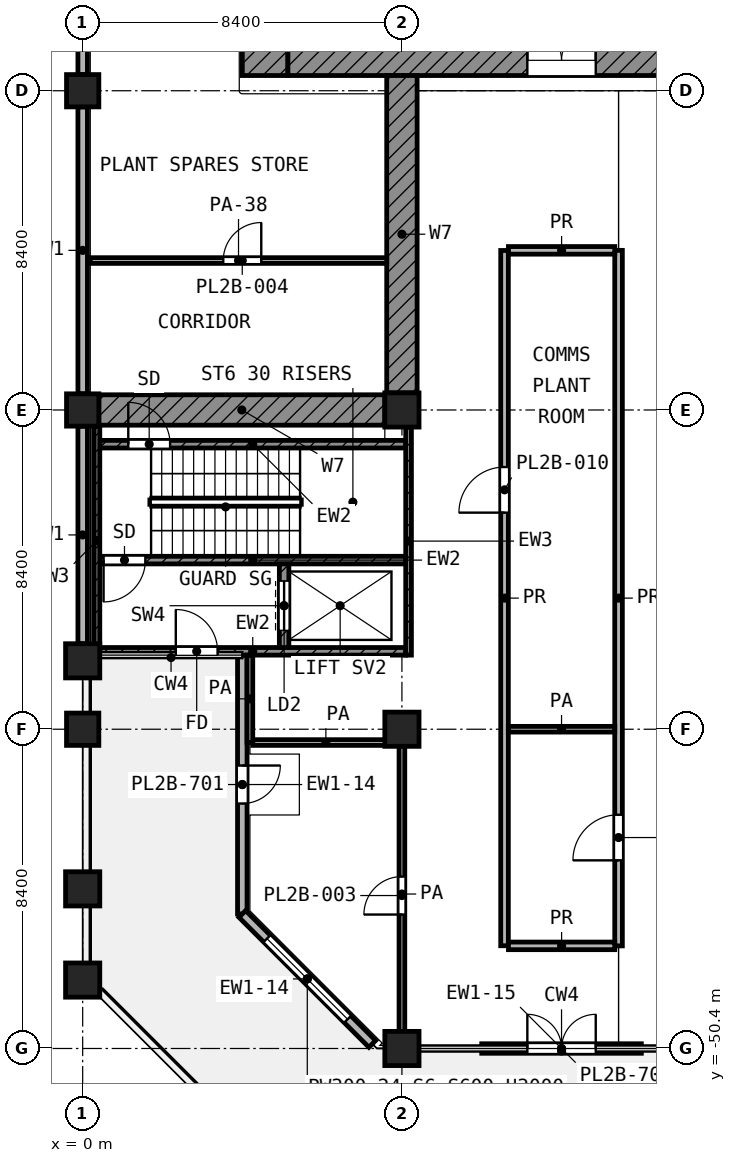
"""IFC4 building model, lengths in metres.
Left out: names, types, materials, properties, quantities, classifications, styles, units other than length and angle.
Written with IfcOpenShell. Run it as: python <this file> out.ifc"""

import sys

from ifc_helpers import new_model, si_unit, direction, frame, frame_2d, origin, origin_2d, place, context, subcontext, project, spatial, rectangle, extrude, element, fill, save


model = new_model("IFC4")
c1 = context("Model", 3, precision=1e-05, world=origin(), true_north=direction((0.0, 1.0)))
c2 = subcontext(c1, "Body", "Model", "MODEL_VIEW")
j1 = project(units=[si_unit("LENGTHUNIT", "METRE"), si_unit("PLANEANGLEUNIT", "RADIAN")], contexts=[c1])
p1 = place(None, origin())
s1 = spatial("IfcSite", under=j1, at=p1, CompositionType="ELEMENT")
p2 = place(p1, origin())
s2 = spatial("IfcBuilding", under=s1, at=p2, CompositionType="ELEMENT")
p3 = place(p2, frame((0.0, 0.0, 213.0)))
s3 = spatial("IfcBuildingStorey", under=s2, at=p3, CompositionType="ELEMENT", Elevation=213.0)
for number, where, z_axis, x_axis in (
    (1, (0.0, -25.2, 0.0), (0.0, 0.0, 1.0), (1.0, 0.0, 0.0)),
    (2, (0.0, -33.6, 0.0), (0.0, 0.0, 1.0), (1.0, 0.0, 0.0)),
):
    element("IfcColumn", number, at=place(p3, frame(where, z_axis=z_axis, x_axis=x_axis)), inside=s3, PredefinedType="COLUMN", context=c2, shape_type="SweptSolid", body=[
        extrude(rectangle(XDim=0.85, YDim=0.85, at=origin_2d()), origin(), (0.0, 0.0, 1.0), 5.0),
    ])
p4 = place(p3, frame((8.4, -33.6, 0.0), z_axis=(0.0, 0.0, 1.0), x_axis=(1.0, 0.0, 0.0)))
e3 = element("IfcColumn", 3, at=p4, inside=s3, PredefinedType="COLUMN", context=c2, shape_type="SweptSolid", body=[
    extrude(rectangle(XDim=0.9, YDim=0.9, at=origin_2d()), origin(), (0.0, 0.0, 1.0), 5.0),
])
p5 = place(p3, frame((0.0, -42.0, 0.0), z_axis=(0.0, 0.0, 1.0), x_axis=(1.0, 0.0, 0.0)))
e4 = element("IfcColumn", 4, at=p5, inside=s3, PredefinedType="COLUMN", context=c2, shape_type="SweptSolid", body=[
    extrude(rectangle(XDim=0.85, YDim=0.85, at=origin_2d()), origin(), (0.0, 0.0, 1.0), 5.0),
])
for number, where, z_axis, x_axis in (
    (5, (8.4, -42.0, 0.0), (0.0, 0.0, 1.0), (1.0, 0.0, 0.0)),
    (6, (0.0, -48.6, 0.0), (0.0, 0.0, 1.0), (1.0, 0.0, 0.0)),
    (7, (8.4, -50.4, 0.0), (0.0, 0.0, 1.0), (1.0, 0.0, 0.0)),
    (8, (0.0, -40.2, 0.0), (0.0, 0.0, 1.0), (1.0, 0.0, 0.0)),
    (9, (0.0, -46.2, 0.0), (0.0, 0.0, 1.0), (1.0, 0.0, 0.0)),
):
    element("IfcColumn", number, at=place(p3, frame(where, z_axis=z_axis, x_axis=x_axis)), inside=s3, PredefinedType="COLUMN", context=c2, shape_type="SweptSolid", body=[
        extrude(rectangle(XDim=0.9, YDim=0.9, at=origin_2d()), origin(), (0.0, 0.0, 1.0), 5.0),
    ])
p6 = place(p3, frame((8.4, -24.8, 0.0), z_axis=(0.0, 0.0, 1.0), x_axis=(0.0, -1.0, 0.0)))
e10 = element("IfcWall", 10, at=p6, inside=s3, PredefinedType="SHEAR", context=c2, shape_type="SweptSolid", body=[
    extrude(rectangle(XDim=8.35, YDim=0.8, at=frame_2d((4.175, 0.0))), origin(), (0.0, 0.0, 1.0), 4.4),
])
p7 = place(p3, frame((0.425, -33.6, 0.0), z_axis=(0.0, 0.0, 1.0), x_axis=(1.0, 0.0, 0.0)))
e11 = element("IfcWall", 11, at=p7, inside=s3, PredefinedType="SHEAR", context=c2, shape_type="SweptSolid", body=[
    extrude(rectangle(XDim=7.525, YDim=0.8, at=frame_2d((3.762, 0.0))), origin(), (0.0, 0.0, 1.0), 4.4),
])
p8 = place(p3, frame((0.0, -17.225, 0.0), z_axis=(0.0, 0.0, 1.0), x_axis=(0.0, -1.0, 0.0)))
e12 = element("IfcWall", 12, at=p8, inside=s3, PredefinedType="SOLIDWALL", context=c2, shape_type="SweptSolid", body=[
    extrude(rectangle(XDim=7.55, YDim=0.25, at=frame_2d((3.775, 0.0))), origin(), (0.0, 0.0, 1.0), 3.2),
])
p9 = place(p3, frame((0.0, -25.625, 0.0), z_axis=(0.0, 0.0, 1.0), x_axis=(0.0, -1.0, 0.0)))
e13 = element("IfcWall", 13, at=p9, inside=s3, PredefinedType="SOLIDWALL", context=c2, shape_type="SweptSolid", body=[
    extrude(rectangle(XDim=7.55, YDim=0.25, at=frame_2d((3.775, 0.0))), origin(), (0.0, 0.0, 1.0), 3.2),
])
p10 = place(p3, frame((0.0, -34.025, 0.0), z_axis=(0.0, 0.0, 1.0), x_axis=(0.0, -1.0, 0.0)))
e14 = element("IfcWall", 14, at=p10, inside=s3, PredefinedType="SOLIDWALL", context=c2, shape_type="SweptSolid", body=[
    extrude(rectangle(XDim=5.725, YDim=0.25, at=frame_2d((2.863, 0.0))), origin(), (0.0, 0.0, 1.0), 3.2),
])
p11 = place(p3, frame((4.2, -40.05, 0.0), z_axis=(0.0, 0.0, 1.0), x_axis=(0.0, -1.0, 0.0)))
e15 = element("IfcWall", 15, at=p11, inside=s3, PredefinedType="SOLIDWALL", context=c2, shape_type="SweptSolid", body=[
    extrude(rectangle(XDim=6.81, YDim=0.25, at=frame_2d((3.405, 0.0))), origin(), (0.0, 0.0, 1.0), 4.4),
])
p12 = place(p11, frame((2.905, 0.0, 0.0)))
e16 = element("IfcOpeningElement", 16, at=p12, cuts=e15, PredefinedType="OPENING", context=c2, shape_type="SweptSolid", body=[
    extrude(rectangle(XDim=1.0, YDim=2.1, at=frame_2d((0.5, 1.05))), frame((0.0, 0.135, 0.0), z_axis=(0.0, -1.0, 0.0), x_axis=(1.0, 0.0, 0.0)), (0.0, 0.0, 1.0), 0.27),
])
p13 = place(p3, frame((4.2, -46.86, 0.0), z_axis=(0.0, 0.0, 1.0), x_axis=(0.707132019226, -0.707081542246, 0.0)))
e17 = element("IfcWall", 17, at=p13, inside=s3, PredefinedType="SOLIDWALL", context=c2, shape_type="SweptSolid", body=[
    extrude(rectangle(XDim=4.837, YDim=0.25, at=frame_2d((2.418, 0.0))), origin(), (0.0, 0.0, 1.0), 4.4),
])
p14 = place(p13, frame((0.918, 0.0, 0.6)))
e18 = element("IfcOpeningElement", 18, at=p14, cuts=e17, PredefinedType="OPENING", context=c2, shape_type="SweptSolid", body=[
    extrude(rectangle(XDim=3.0, YDim=2.4, at=frame_2d((1.5, 1.2))), frame((0.0, 0.135, 0.0), z_axis=(0.0, -1.0, 0.0), x_axis=(1.0, 0.0, 0.0)), (0.0, 0.0, 1.0), 0.27),
])
p15 = place(p3, frame((10.5, -50.401, 0.0), z_axis=(0.0, 0.0, 1.0), x_axis=(1.0, 0.0, 0.0)))
e19 = element("IfcWall", 19, at=p15, inside=s3, PredefinedType="SOLIDWALL", context=c2, shape_type="SweptSolid", body=[
    extrude(rectangle(XDim=4.2, YDim=0.25, at=frame_2d((2.1, 0.0))), origin(), (0.0, 0.0, 1.0), 4.24),
])
p16 = place(p15, frame((1.2, 0.0, 0.0)))
e20 = element("IfcOpeningElement", 20, at=p16, cuts=e19, PredefinedType="OPENING", context=c2, shape_type="SweptSolid", body=[
    extrude(rectangle(XDim=1.8, YDim=2.1, at=frame_2d((0.9, 1.05))), frame((0.0, 0.135, 0.0), z_axis=(0.0, -1.0, 0.0), x_axis=(1.0, 0.0, 0.0)), (0.0, 0.0, 1.0), 0.27),
])
p17 = place(p3, frame((4.8, -24.8, 0.0), z_axis=(0.0, 0.0, 1.0), x_axis=(0.0, 1.0, 0.0)))
e21 = element("IfcWall", 21, at=p17, inside=s3, PredefinedType="SHEAR", context=c2, shape_type="SweptSolid", body=[
    extrude(rectangle(XDim=19.4, YDim=1.2, at=frame_2d((9.7, 0.0))), origin(), (0.0, 0.0, 1.0), 4.4),
])
p18 = place(p17, frame((11.25, 0.0, 0.0)))
e22 = element("IfcOpeningElement", 22, at=p18, cuts=e21, PredefinedType="OPENING", context=c2, shape_type="SweptSolid", body=[
    extrude(rectangle(XDim=1.1, YDim=2.1, at=frame_2d((0.55, 1.05))), frame((0.0, 0.61, 0.0), z_axis=(0.0, -1.0, 0.0), x_axis=(1.0, 0.0, 0.0)), (0.0, 0.0, 1.0), 1.22),
])
p19 = place(p17, frame((1.95, 0.0, 0.0)))
e23 = element("IfcOpeningElement", 23, at=p19, cuts=e21, PredefinedType="OPENING", context=c2, shape_type="SweptSolid", body=[
    extrude(rectangle(XDim=1.1, YDim=2.1, at=frame_2d((0.55, 1.05))), frame((0.0, 0.61, 0.0), z_axis=(0.0, -1.0, 0.0), x_axis=(1.0, 0.0, 0.0)), (0.0, 0.0, 1.0), 1.22),
])
p20 = place(p3, frame((5.4, -24.4, 0.0), z_axis=(0.0, 0.0, 1.0), x_axis=(1.0, 0.0, 0.0)))
e24 = element("IfcWall", 24, at=p20, inside=s3, PredefinedType="SHEAR", context=c2, shape_type="SweptSolid", body=[
    extrude(rectangle(XDim=18.6, YDim=0.8, at=frame_2d((9.3, 0.0))), origin(), (0.0, 0.0, 1.0), 4.4),
])
p21 = place(p20, frame((6.3, 0.0, 0.0)))
e25 = element("IfcOpeningElement", 25, at=p21, cuts=e24, PredefinedType="OPENING", context=c2, shape_type="SweptSolid", body=[
    extrude(rectangle(XDim=1.8, YDim=2.1, at=frame_2d((0.9, 1.05))), frame((0.0, 0.41, 0.0), z_axis=(0.0, -1.0, 0.0), x_axis=(1.0, 0.0, 0.0)), (0.0, 0.0, 1.0), 0.82),
])
p22 = place(p3, frame((0.375, -40.05, 0.0), z_axis=(0.0, 0.0, 1.0), x_axis=(0.0, 1.0, 0.0)))
e26 = element("IfcWall", 26, at=p22, inside=s3, PredefinedType="SHEAR", context=c2, shape_type="SweptSolid", body=[
    extrude(rectangle(XDim=6.025, YDim=0.15, at=frame_2d((3.013, 0.0))), origin(), (0.0, 0.0, 1.0), 4.4),
])
p23 = place(p3, frame((8.575, -40.05, 0.0), z_axis=(0.0, 0.0, 1.0), x_axis=(0.0, 1.0, 0.0)))
e27 = element("IfcWall", 27, at=p23, inside=s3, PredefinedType="SHEAR", context=c2, shape_type="SweptSolid", body=[
    extrude(rectangle(XDim=6.0, YDim=0.15, at=frame_2d((3.0, 0.0))), origin(), (0.0, 0.0, 1.0), 4.4),
])
p24 = place(p3, frame((0.45, -34.5, 0.0), z_axis=(0.0, 0.0, 1.0), x_axis=(1.0, 0.0, 0.0)))
e28 = element("IfcWall", 28, at=p24, inside=s3, PredefinedType="SHEAR", context=c2, shape_type="SweptSolid", body=[
    extrude(rectangle(XDim=8.05, YDim=0.2, at=frame_2d((4.025, 0.0))), origin(), (0.0, 0.0, 1.0), 4.4),
])
p25 = place(p24, frame((0.75, 0.0, 0.0)))
e29 = element("IfcOpeningElement", 29, at=p25, cuts=e28, PredefinedType="OPENING", context=c2, shape_type="SweptSolid", body=[
    extrude(rectangle(XDim=1.1, YDim=2.1, at=frame_2d((0.55, 1.05))), frame((0.0, 0.11, 0.0), z_axis=(0.0, -1.0, 0.0), x_axis=(1.0, 0.0, 0.0)), (0.0, 0.0, 1.0), 0.22),
])
p26 = place(p3, frame((0.45, -37.55, 0.0), z_axis=(0.0, 0.0, 1.0), x_axis=(1.0, 0.0, 0.0)))
e30 = element("IfcWall", 30, at=p26, inside=s3, PredefinedType="SHEAR", context=c2, shape_type="SweptSolid", body=[
    extrude(rectangle(XDim=8.05, YDim=0.2, at=frame_2d((4.025, 0.0))), origin(), (0.0, 0.0, 1.0), 4.4),
])
p27 = place(p26, frame((0.1, 0.0, 0.0)))
e31 = element("IfcOpeningElement", 31, at=p27, cuts=e30, PredefinedType="OPENING", context=c2, shape_type="SweptSolid", body=[
    extrude(rectangle(XDim=1.1, YDim=2.1, at=frame_2d((0.55, 1.05))), frame((0.0, 0.11, 0.0), z_axis=(0.0, -1.0, 0.0), x_axis=(1.0, 0.0, 0.0)), (0.0, 0.0, 1.0), 0.22),
])
p28 = place(p3, frame((0.45, -39.95, 0.0), z_axis=(0.0, 0.0, 1.0), x_axis=(1.0, 0.0, 0.0)))
e32 = element("IfcWall", 32, at=p28, inside=s3, PredefinedType="SHEAR", context=c2, shape_type="SweptSolid", body=[
    extrude(rectangle(XDim=8.05, YDim=0.2, at=frame_2d((4.025, 0.0))), origin(), (0.0, 0.0, 1.0), 4.4),
])
p29 = place(p28, frame((2.0, 0.0, 0.0)))
e33 = element("IfcOpeningElement", 33, at=p29, cuts=e32, PredefinedType="OPENING", context=c2, shape_type="SweptSolid", body=[
    extrude(rectangle(XDim=1.1, YDim=2.1, at=frame_2d((0.55, 1.05))), frame((0.0, 0.11, 0.0), z_axis=(0.0, -1.0, 0.0), x_axis=(1.0, 0.0, 0.0)), (0.0, 0.0, 1.0), 0.22),
])
p30 = place(p3, frame((5.3, -39.85, 0.0), z_axis=(0.0, 0.0, 1.0), x_axis=(0.0, 1.0, 0.0)))
e34 = element("IfcWall", 34, at=p30, inside=s3, PredefinedType="SHEAR", context=c2, shape_type="SweptSolid", body=[
    extrude(rectangle(XDim=2.2, YDim=0.25, at=frame_2d((1.1, 0.0))), origin(), (0.0, 0.0, 1.0), 4.4),
])
p31 = place(p30, frame((0.45, 0.0, 0.0)))
e35 = element("IfcOpeningElement", 35, at=p31, cuts=e34, PredefinedType="OPENING", context=c2, shape_type="SweptSolid", body=[
    extrude(rectangle(XDim=1.3, YDim=2.1, at=frame_2d((0.65, 1.05))), frame((0.0, 0.135, 0.0), z_axis=(0.0, -1.0, 0.0), x_axis=(1.0, 0.0, 0.0)), (0.0, 0.0, 1.0), 0.27),
])
p32 = place(p3, frame((4.475, -42.35, 0.0), z_axis=(0.0, 0.0, 1.0), x_axis=(1.0, 0.0, 0.0)))
e36 = element("IfcWall", 36, at=p32, inside=s3, PredefinedType="PARTITIONING", context=c2, shape_type="SweptSolid", body=[
    extrude(rectangle(XDim=3.848, YDim=0.15, at=frame_2d((1.924, 0.0))), origin(), (0.0, 0.0, 1.0), 4.4),
])
p33 = place(p3, frame((11.2, -42.0, 0.0), z_axis=(0.0, 0.0, 1.0), x_axis=(1.0, 0.0, 0.0)))
e37 = element("IfcWall", 37, at=p33, inside=s3, PredefinedType="PARTITIONING", context=c2, shape_type="SweptSolid", body=[
    extrude(rectangle(XDim=2.8, YDim=0.15, at=frame_2d((1.4, 0.0))), origin(), (0.0, 0.0, 1.0), 4.4),
])
p34 = place(p3, frame((0.2, -29.668, 0.0), z_axis=(0.0, 0.0, 1.0), x_axis=(1.0, 0.0, 0.0)))
e38 = element("IfcWall", 38, at=p34, inside=s3, PredefinedType="PARTITIONING", context=c2, shape_type="SweptSolid", body=[
    extrude(rectangle(XDim=7.801, YDim=0.15, at=frame_2d((3.9, 0.0))), origin(), (0.0, 0.0, 1.0), 3.2),
])
p35 = place(p34, frame((3.499, 0.0, 0.0)))
e39 = element("IfcOpeningElement", 39, at=p35, cuts=e38, PredefinedType="OPENING", context=c2, shape_type="SweptSolid", body=[
    extrude(rectangle(XDim=1.0, YDim=2.1, at=frame_2d((0.5, 1.05))), frame((0.0, 0.085, 0.0), z_axis=(0.0, -1.0, 0.0), x_axis=(1.0, 0.0, 0.0)), (0.0, 0.0, 1.0), 0.17),
])
p36 = place(p3, frame((4.4, -42.35, 0.0), z_axis=(0.0, 0.0, 1.0), x_axis=(0.0, 1.0, 0.0)))
e40 = element("IfcWall", 40, at=p36, inside=s3, PredefinedType="PARTITIONING", context=c2, shape_type="SweptSolid", body=[
    extrude(rectangle(XDim=2.299, YDim=0.15, at=frame_2d((1.149, 0.0))), origin(), (0.0, 0.0, 1.0), 4.4),
])
p37 = place(p3, frame((8.4, -50.321, 0.0), z_axis=(0.0, 0.0, 1.0), x_axis=(0.0, 1.0, 0.0)))
e41 = element("IfcWall", 41, at=p37, inside=s3, PredefinedType="PARTITIONING", context=c2, shape_type="SweptSolid", body=[
    extrude(rectangle(XDim=7.97, YDim=0.15, at=frame_2d((3.985, 0.0))), origin(), (0.0, 0.0, 1.0), 4.4),
])
p38 = place(p37, frame((3.445, 0.0, 0.0)))
e42 = element("IfcOpeningElement", 42, at=p38, cuts=e41, PredefinedType="OPENING", context=c2, shape_type="SweptSolid", body=[
    extrude(rectangle(XDim=1.0, YDim=2.1, at=frame_2d((0.5, 1.05))), frame((0.0, 0.085, 0.0), z_axis=(0.0, -1.0, 0.0), x_axis=(1.0, 0.0, 0.0)), (0.0, 0.0, 1.0), 0.17),
])
for number, where, z_axis, x_axis in (
    (43, (11.203, -47.7, 0.0), (0.0, 0.0, 1.0), (1.0, 0.0, 0.0)),
    (44, (11.203, -29.4, 0.0), (0.0, 0.0, 1.0), (1.0, 0.0, 0.0)),
):
    element("IfcWall", number, at=place(p3, frame(where, z_axis=z_axis, x_axis=x_axis)), inside=s3, PredefinedType="PARTITIONING", context=c2, shape_type="SweptSolid", body=[
        extrude(rectangle(XDim=2.797, YDim=0.2, at=frame_2d((1.398, 0.0))), origin(), (0.0, 0.0, 1.0), 4.4),
    ])
p39 = place(p3, frame((11.1, -47.697, 0.0), z_axis=(0.0, 0.0, 1.0), x_axis=(0.0, 1.0, 0.0)))
e45 = element("IfcWall", 45, at=p39, inside=s3, PredefinedType="PARTITIONING", context=c2, shape_type="SweptSolid", body=[
    extrude(rectangle(XDim=18.294, YDim=0.2, at=frame_2d((9.147, 0.0))), origin(), (0.0, 0.0, 1.0), 4.4),
])
p40 = place(p39, frame((11.396, 0.0, 0.0)))
e46 = element("IfcOpeningElement", 46, at=p40, cuts=e45, PredefinedType="OPENING", context=c2, shape_type="SweptSolid", body=[
    extrude(rectangle(XDim=1.2, YDim=2.1, at=frame_2d((0.6, 1.05))), frame((0.0, 0.11, 0.0), z_axis=(0.0, -1.0, 0.0), x_axis=(1.0, 0.0, 0.0)), (0.0, 0.0, 1.0), 0.22),
])
p41 = place(p3, frame((14.1, -47.7, 0.0), z_axis=(0.0, 0.0, 1.0), x_axis=(0.0, 1.0, 0.0)))
e47 = element("IfcWall", 47, at=p41, inside=s3, PredefinedType="PARTITIONING", context=c2, shape_type="SweptSolid", body=[
    extrude(rectangle(XDim=18.3, YDim=0.2, at=frame_2d((9.15, 0.0))), origin(), (0.0, 0.0, 1.0), 4.4),
])
p42 = place(p41, frame((2.25, 0.0, 0.0)))
e48 = element("IfcOpeningElement", 48, at=p42, cuts=e47, PredefinedType="OPENING", context=c2, shape_type="SweptSolid", body=[
    extrude(rectangle(XDim=1.2, YDim=2.1, at=frame_2d((0.6, 1.05))), frame((0.0, 0.11, 0.0), z_axis=(0.0, -1.0, 0.0), x_axis=(1.0, 0.0, 0.0)), (0.0, 0.0, 1.0), 0.22),
])
p43 = place(p12, origin())
e49 = element("IfcDoor", 49, at=p43, inside=s3, OperationType="SINGLE_SWING_LEFT", PredefinedType="DOOR", context=c2, shape_type="SweptSolid", body=[
    extrude(rectangle(XDim=1.0, YDim=2.1, at=frame_2d((0.5, 1.05))), frame((0.0, 0.025, 0.0), z_axis=(0.0, -1.0, 0.0), x_axis=(1.0, 0.0, 0.0)), (0.0, 0.0, 1.0), 0.05),
])
fill(e16, e49)
p44 = place(p14, origin())
e50 = element("IfcWindow", 50, at=p44, inside=s3, PartitioningType="SINGLE_PANEL", PredefinedType="WINDOW", context=c2, shape_type="SweptSolid", body=[
    extrude(rectangle(XDim=3.0, YDim=2.4, at=frame_2d((1.5, 1.2))), frame((0.0, 0.03, 0.0), z_axis=(0.0, -1.0, 0.0), x_axis=(1.0, 0.0, 0.0)), (0.0, 0.0, 1.0), 0.06),
])
fill(e18, e50)
p45 = place(p16, origin())
e51 = element("IfcDoor", 51, at=p45, inside=s3, OperationType="DOUBLE_DOOR_SINGLE_SWING", PredefinedType="DOOR", context=c2, shape_type="SweptSolid", body=[
    extrude(rectangle(XDim=1.8, YDim=2.1, at=frame_2d((0.9, 1.05))), frame((0.0, 0.025, 0.0), z_axis=(0.0, -1.0, 0.0), x_axis=(1.0, 0.0, 0.0)), (0.0, 0.0, 1.0), 0.05),
])
fill(e20, e51)
p46 = place(p21, origin())
e52 = element("IfcDoor", 52, at=p46, inside=s3, OperationType="DOUBLE_DOOR_SINGLE_SWING", PredefinedType="DOOR", context=c2, shape_type="SweptSolid", body=[
    extrude(rectangle(XDim=1.8, YDim=2.1, at=frame_2d((0.9, 1.05))), frame((0.0, 0.025, 0.0), z_axis=(0.0, -1.0, 0.0), x_axis=(1.0, 0.0, 0.0)), (0.0, 0.0, 1.0), 0.05),
])
fill(e25, e52)
p47 = place(p25, origin())
e53 = element("IfcDoor", 53, at=p47, inside=s3, OperationType="SINGLE_SWING_LEFT", PredefinedType="DOOR", context=c2, shape_type="SweptSolid", body=[
    extrude(rectangle(XDim=1.1, YDim=2.1, at=frame_2d((0.55, 1.05))), frame((0.0, 0.025, 0.0), z_axis=(0.0, -1.0, 0.0), x_axis=(1.0, 0.0, 0.0)), (0.0, 0.0, 1.0), 0.05),
])
fill(e29, e53)
p48 = place(p27, frame((1.1, 0.0, 0.0), z_axis=(0.0, 0.0, 1.0), x_axis=(-1.0, 0.0, 0.0)))
e54 = element("IfcDoor", 54, at=p48, inside=s3, OperationType="SINGLE_SWING_LEFT", PredefinedType="DOOR", context=c2, shape_type="SweptSolid", body=[
    extrude(rectangle(XDim=1.1, YDim=2.1, at=frame_2d((0.55, 1.05))), frame((0.0, 0.025, 0.0), z_axis=(0.0, -1.0, 0.0), x_axis=(1.0, 0.0, 0.0)), (0.0, 0.0, 1.0), 0.05),
])
fill(e31, e54)
p49 = place(p31, origin())
e55 = element("IfcDoor", 55, at=p49, inside=s3, OperationType="DOUBLE_DOOR_SLIDING", PredefinedType="DOOR", context=c2, shape_type="SweptSolid", body=[
    extrude(rectangle(XDim=1.3, YDim=2.1, at=frame_2d((0.65, 1.05))), frame((0.0, 0.025, 0.0), z_axis=(0.0, -1.0, 0.0), x_axis=(1.0, 0.0, 0.0)), (0.0, 0.0, 1.0), 0.05),
])
fill(e35, e55)
p50 = place(p29, origin())
e56 = element("IfcDoor", 56, at=p50, inside=s3, OperationType="SINGLE_SWING_LEFT", PredefinedType="DOOR", context=c2, shape_type="SweptSolid", body=[
    extrude(rectangle(XDim=1.1, YDim=2.1, at=frame_2d((0.55, 1.05))), frame((0.0, 0.025, 0.0), z_axis=(0.0, -1.0, 0.0), x_axis=(1.0, 0.0, 0.0)), (0.0, 0.0, 1.0), 0.05),
])
fill(e33, e56)
p51 = place(p38, origin())
e57 = element("IfcDoor", 57, at=p51, inside=s3, OperationType="SINGLE_SWING_LEFT", PredefinedType="DOOR", context=c2, shape_type="SweptSolid", body=[
    extrude(rectangle(XDim=1.0, YDim=2.1, at=frame_2d((0.5, 1.05))), frame((0.0, 0.025, 0.0), z_axis=(0.0, -1.0, 0.0), x_axis=(1.0, 0.0, 0.0)), (0.0, 0.0, 1.0), 0.05),
])
fill(e42, e57)
p52 = place(p40, origin())
e58 = element("IfcDoor", 58, at=p52, inside=s3, OperationType="SINGLE_SWING_LEFT", PredefinedType="DOOR", context=c2, shape_type="SweptSolid", body=[
    extrude(rectangle(XDim=1.2, YDim=2.1, at=frame_2d((0.6, 1.05))), frame((0.0, 0.025, 0.0), z_axis=(0.0, -1.0, 0.0), x_axis=(1.0, 0.0, 0.0)), (0.0, 0.0, 1.0), 0.05),
])
fill(e46, e58)
p53 = place(p42, origin())
e59 = element("IfcDoor", 59, at=p53, inside=s3, OperationType="SINGLE_SWING_LEFT", PredefinedType="DOOR", context=c2, shape_type="SweptSolid", body=[
    extrude(rectangle(XDim=1.2, YDim=2.1, at=frame_2d((0.6, 1.05))), frame((0.0, 0.025, 0.0), z_axis=(0.0, -1.0, 0.0), x_axis=(1.0, 0.0, 0.0)), (0.0, 0.0, 1.0), 0.05),
])
fill(e48, e59)
p54 = place(p35, origin())
e60 = element("IfcDoor", 60, at=p54, inside=s3, OperationType="SINGLE_SWING_RIGHT", PredefinedType="DOOR", context=c2, shape_type="SweptSolid", body=[
    extrude(rectangle(XDim=1.0, YDim=2.1, at=frame_2d((0.5, 1.05))), frame((0.0, 0.025, 0.0), z_axis=(0.0, -1.0, 0.0), x_axis=(1.0, 0.0, 0.0)), (0.0, 0.0, 1.0), 0.05),
])
fill(e39, e60)
save(model, sys.argv[1])
